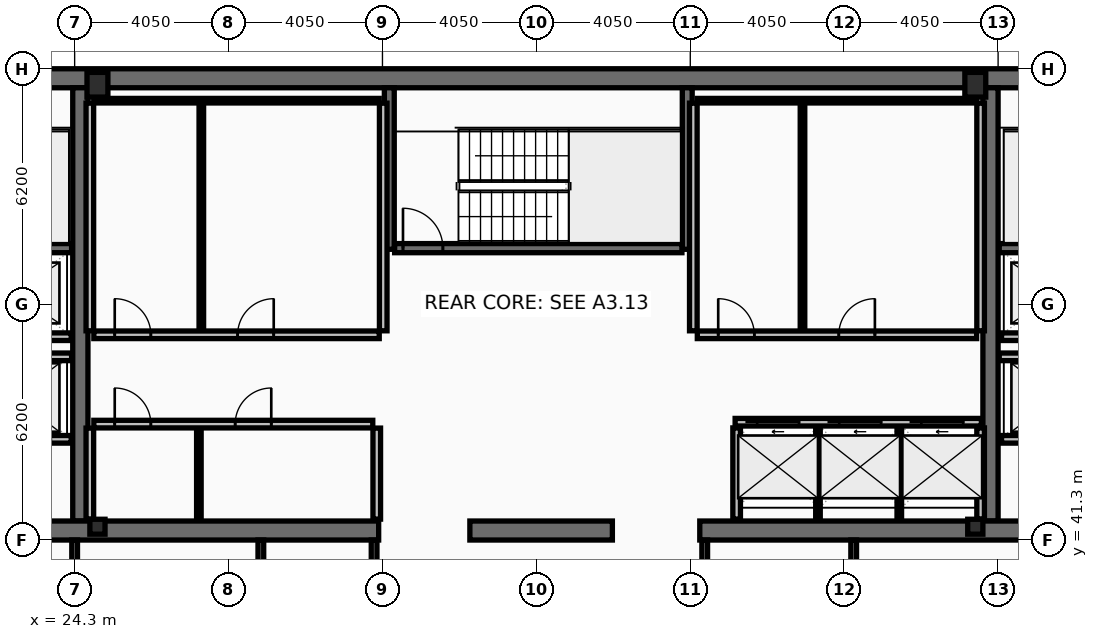
"""IFC4 building model, lengths in metres.
Left out: names, types, materials, properties, quantities, classifications, styles, units other than length and angle.
Written with IfcOpenShell. Run it as: python <this file> out.ifc"""

import sys

from ifc_helpers import new_model, si_unit, direction, frame, frame_2d, origin, origin_2d, place, context, subcontext, project, spatial, rectangle, hollow_rectangle, i_section, extrude, element, fill, save


model = new_model("IFC4")
c1 = context("Model", 3, precision=1e-05, world=origin(), true_north=direction((0.0, 1.0)))
c2 = subcontext(c1, "Body", "Model", "MODEL_VIEW")
j1 = project(units=[si_unit("LENGTHUNIT", "METRE"), si_unit("PLANEANGLEUNIT", "RADIAN")], contexts=[c1])
p1 = place(None, origin())
s1 = spatial("IfcSite", under=j1, at=p1, CompositionType="ELEMENT")
p2 = place(p1, origin())
s2 = spatial("IfcBuilding", under=s1, at=p2, CompositionType="ELEMENT")
p3 = place(p2, frame((0.0, 0.0, 339.8)))
s3 = spatial("IfcBuildingStorey", under=s2, at=p3, CompositionType="ELEMENT", Elevation=339.8)
p4 = place(p3, frame((16.2, 53.45, 0.0), z_axis=(0.0, 0.0, 1.0), x_axis=(1.0, 0.0, 0.0)))
e1 = element("IfcWall", 1, at=p4, inside=s3, PredefinedType="SHEAR", context=c2, shape_type="SweptSolid", body=[
    extrude(rectangle(XDim=40.5, YDim=0.5, at=frame_2d((20.25, 0.0))), origin(), (0.0, 0.0, 1.0), 3.44),
])
for number, where, z_axis, x_axis in (
    (2, (24.45, 41.8, 0.0), (0.0, 0.0, 1.0), (0.0, 1.0, 0.0)),
    (3, (48.4, 41.8, 0.0), (0.0, 0.0, 1.0), (0.0, 1.0, 0.0)),
):
    element("IfcWall", number, at=place(p3, frame(where, z_axis=z_axis, x_axis=x_axis)), inside=s3, PredefinedType="SHEAR", context=c2, shape_type="SweptSolid", body=[
        extrude(rectangle(XDim=11.4, YDim=0.4, at=frame_2d((5.7, 0.0))), origin(), (0.0, 0.0, 1.0), 3.44),
    ])
p5 = place(p3, frame((32.3, 41.55, 0.0), z_axis=(0.0, 0.0, 1.0), x_axis=(-1.0, 0.0, 0.0)))
e4 = element("IfcWall", 4, at=p5, inside=s3, PredefinedType="SHEAR", context=c2, shape_type="SweptSolid", body=[
    extrude(rectangle(XDim=11.45, YDim=0.5, at=frame_2d((5.725, 0.0))), origin(), (0.0, 0.0, 1.0), 3.44),
])
p6 = place(p3, frame((38.45, 41.55, 0.0), z_axis=(0.0, 0.0, 1.0), x_axis=(-1.0, 0.0, 0.0)))
e5 = element("IfcWall", 5, at=p6, inside=s3, PredefinedType="SHEAR", context=c2, shape_type="SweptSolid", body=[
    extrude(rectangle(XDim=3.75, YDim=0.5, at=frame_2d((1.875, 0.0))), origin(), (0.0, 0.0, 1.0), 3.44),
])
p7 = place(p3, frame((52.05, 41.55, 0.0), z_axis=(0.0, 0.0, 1.0), x_axis=(-1.0, 0.0, 0.0)))
e6 = element("IfcWall", 6, at=p7, inside=s3, PredefinedType="SHEAR", context=c2, shape_type="SweptSolid", body=[
    extrude(rectangle(XDim=11.3, YDim=0.5, at=frame_2d((5.65, 0.0))), origin(), (0.0, 0.0, 1.0), 3.44),
])
for number, where, z_axis, x_axis in (
    (7, (32.58, 48.95, 0.0), (0.0, 0.0, 1.0), (0.0, 1.0, 0.0)),
    (8, (40.42, 48.95, 0.0), (0.0, 0.0, 1.0), (0.0, 1.0, 0.0)),
):
    element("IfcWall", number, at=place(p3, frame(where, z_axis=z_axis, x_axis=x_axis)), inside=s3, PredefinedType="SHEAR", context=c2, shape_type="SweptSolid", body=[
        extrude(rectangle(XDim=4.25, YDim=0.26, at=frame_2d((2.125, 0.0))), origin(), (0.0, 0.0, 1.0), 3.44),
    ])
p8 = place(p3, frame((16.7, 48.98, 0.0), z_axis=(0.0, 0.0, 1.0), x_axis=(1.0, 0.0, 0.0)))
e9 = element("IfcWall", 9, at=p8, inside=s3, PredefinedType="SHEAR", context=c2, shape_type="SweptSolid", body=[
    extrude(rectangle(XDim=7.52, YDim=0.24, at=frame_2d((3.76, 0.0))), origin(), (0.0, 0.0, 1.0), 3.44),
])
p9 = place(p8, frame((0.22, 0.0, 0.0)))
e10 = element("IfcOpeningElement", 10, at=p9, cuts=e9, PredefinedType="OPENING", context=c2, shape_type="SweptSolid", body=[
    extrude(rectangle(XDim=1.05, YDim=2.15, at=frame_2d((0.525, 1.075))), frame((0.0, 0.13, 0.0), z_axis=(0.0, -1.0, 0.0), x_axis=(1.0, 0.0, 0.0)), (0.0, 0.0, 1.0), 0.26),
])
p10 = place(p3, frame((48.63, 48.98, 0.0), z_axis=(0.0, 0.0, 1.0), x_axis=(1.0, 0.0, 0.0)))
e11 = element("IfcWall", 11, at=p10, inside=s3, PredefinedType="SHEAR", context=c2, shape_type="SweptSolid", body=[
    extrude(rectangle(XDim=7.57, YDim=0.24, at=frame_2d((3.785, 0.0))), origin(), (0.0, 0.0, 1.0), 3.44),
])
p11 = place(p10, frame((6.3, 0.0, 0.0)))
e12 = element("IfcOpeningElement", 12, at=p11, cuts=e11, PredefinedType="OPENING", context=c2, shape_type="SweptSolid", body=[
    extrude(rectangle(XDim=1.05, YDim=2.15, at=frame_2d((0.525, 1.075))), frame((0.0, 0.13, 0.0), z_axis=(0.0, -1.0, 0.0), x_axis=(1.0, 0.0, 0.0)), (0.0, 0.0, 1.0), 0.26),
])
p12 = place(p3, frame((32.72, 48.98, 0.0), z_axis=(0.0, 0.0, 1.0), x_axis=(1.0, 0.0, 0.0)))
e13 = element("IfcWall", 13, at=p12, inside=s3, PredefinedType="SHEAR", context=c2, shape_type="SweptSolid", body=[
    extrude(rectangle(XDim=7.56, YDim=0.24, at=frame_2d((3.78, 0.0))), origin(), (0.0, 0.0, 1.0), 3.44),
])
p13 = place(p12, frame((0.22, 0.0, 0.0)))
e14 = element("IfcOpeningElement", 14, at=p13, cuts=e13, PredefinedType="OPENING", context=c2, shape_type="SweptSolid", body=[
    extrude(rectangle(XDim=1.05, YDim=2.15, at=frame_2d((0.525, 1.075))), frame((0.0, 0.13, 0.0), z_axis=(0.0, -1.0, 0.0), x_axis=(1.0, 0.0, 0.0)), (0.0, 0.0, 1.0), 0.26),
])
for number, where, z_axis, x_axis in (
    (15, (24.9, 53.28, 0.0), (0.0, 0.0, 1.0), (1.0, 0.0, 0.0)),
    (16, (48.0, 53.28, 0.0), (0.0, 0.0, 1.0), (1.0, 0.0, 0.0)),
):
    element("IfcColumn", number, at=place(p3, frame(where, z_axis=z_axis, x_axis=x_axis)), inside=s3, PredefinedType="COLUMN", context=c2, shape_type="SweptSolid", body=[
        extrude(hollow_rectangle(XDim=0.55, YDim=0.65, WallThickness=0.04, at=origin_2d()), origin(), (0.0, 0.0, 1.0), 3.6),
    ])
for number, where, z_axis, x_axis in (
    (17, (24.9, 41.65, 0.0), (0.0, 0.0, 1.0), (1.0, 0.0, 0.0)),
    (18, (48.0, 41.65, 0.0), (0.0, 0.0, 1.0), (1.0, 0.0, 0.0)),
):
    element("IfcColumn", number, at=place(p3, frame(where, z_axis=z_axis, x_axis=x_axis)), inside=s3, PredefinedType="COLUMN", context=c2, shape_type="SweptSolid", body=[
        extrude(i_section(OverallWidth=0.399, OverallDepth=0.393, WebThickness=0.023, FlangeThickness=0.037, at=origin_2d()), origin(), (0.0, 0.0, 1.0), 3.6),
    ])
p14 = place(p3, frame((41.68, 44.4, 0.0), z_axis=(0.0, 0.0, 1.0), x_axis=(1.0, 0.0, 0.0)))
e19 = element("IfcWall", 19, at=p14, inside=s3, PredefinedType="PARTITIONING", context=c2, shape_type="SweptSolid", body=[
    extrude(rectangle(XDim=6.48, YDim=0.2, at=frame_2d((3.24, 0.0))), origin(), (0.0, 0.0, 1.0), 3.44),
])
p15 = place(p14, frame((0.58, 0.0, 0.0)))
e20 = element("IfcOpeningElement", 20, at=p15, cuts=e19, PredefinedType="OPENING", context=c2, shape_type="SweptSolid", body=[
    extrude(rectangle(XDim=1.1, YDim=2.18, at=frame_2d((0.55, 1.09))), frame((0.0, 0.11, 0.0), z_axis=(0.0, -1.0, 0.0), x_axis=(1.0, 0.0, 0.0)), (0.0, 0.0, 1.0), 0.22),
])
p16 = place(p14, frame((2.74, 0.0, 0.0)))
e21 = element("IfcOpeningElement", 21, at=p16, cuts=e19, PredefinedType="OPENING", context=c2, shape_type="SweptSolid", body=[
    extrude(rectangle(XDim=1.1, YDim=2.18, at=frame_2d((0.55, 1.09))), frame((0.0, 0.11, 0.0), z_axis=(0.0, -1.0, 0.0), x_axis=(1.0, 0.0, 0.0)), (0.0, 0.0, 1.0), 0.22),
])
p17 = place(p14, frame((4.9, 0.0, 0.0)))
e22 = element("IfcOpeningElement", 22, at=p17, cuts=e19, PredefinedType="OPENING", context=c2, shape_type="SweptSolid", body=[
    extrude(rectangle(XDim=1.1, YDim=2.18, at=frame_2d((0.55, 1.09))), frame((0.0, 0.11, 0.0), z_axis=(0.0, -1.0, 0.0), x_axis=(1.0, 0.0, 0.0)), (0.0, 0.0, 1.0), 0.22),
])
p18 = place(p3, frame((51.61, 43.95, 0.0), z_axis=(0.0, 0.0, 1.0), x_axis=(-1.0, 0.0, 0.0)))
e23 = element("IfcWall", 23, at=p18, inside=s3, PredefinedType="PARTITIONING", context=c2, shape_type="SweptSolid", body=[
    extrude(rectangle(XDim=2.92, YDim=0.2, at=frame_2d((1.46, 0.0))), origin(), (0.0, 0.0, 1.0), 3.44),
])
p19 = place(p18, frame((0.81, 0.0, 0.0)))
e24 = element("IfcOpeningElement", 24, at=p19, cuts=e23, PredefinedType="OPENING", context=c2, shape_type="SweptSolid", body=[
    extrude(rectangle(XDim=1.3, YDim=2.18, at=frame_2d((0.65, 1.09))), frame((0.0, 0.11, 0.0), z_axis=(0.0, -1.0, 0.0), x_axis=(1.0, 0.0, 0.0)), (0.0, 0.0, 1.0), 0.22),
])
p20 = place(p3, frame((24.21, 43.95, 0.0), z_axis=(0.0, 0.0, 1.0), x_axis=(-1.0, 0.0, 0.0)))
e25 = element("IfcWall", 25, at=p20, inside=s3, PredefinedType="PARTITIONING", context=c2, shape_type="SweptSolid", body=[
    extrude(rectangle(XDim=2.97, YDim=0.2, at=frame_2d((1.485, 0.0))), origin(), (0.0, 0.0, 1.0), 3.44),
])
p21 = place(p20, frame((0.86, 0.0, 0.0)))
e26 = element("IfcOpeningElement", 26, at=p21, cuts=e25, PredefinedType="OPENING", context=c2, shape_type="SweptSolid", body=[
    extrude(rectangle(XDim=1.3, YDim=2.18, at=frame_2d((0.65, 1.09))), frame((0.0, 0.11, 0.0), z_axis=(0.0, -1.0, 0.0), x_axis=(1.0, 0.0, 0.0)), (0.0, 0.0, 1.0), 0.22),
])
p22 = place(p3, frame((51.61, 46.65, 0.0), z_axis=(0.0, 0.0, 1.0), x_axis=(-1.0, 0.0, 0.0)))
e27 = element("IfcWall", 27, at=p22, inside=s3, PredefinedType="PARTITIONING", context=c2, shape_type="SweptSolid", body=[
    extrude(rectangle(XDim=2.92, YDim=0.2, at=frame_2d((1.46, 0.0))), origin(), (0.0, 0.0, 1.0), 3.44),
])
p23 = place(p22, frame((0.86, 0.0, 0.0)))
e28 = element("IfcOpeningElement", 28, at=p23, cuts=e27, PredefinedType="OPENING", context=c2, shape_type="SweptSolid", body=[
    extrude(rectangle(XDim=1.2, YDim=2.18, at=frame_2d((0.6, 1.09))), frame((0.0, 0.11, 0.0), z_axis=(0.0, -1.0, 0.0), x_axis=(1.0, 0.0, 0.0)), (0.0, 0.0, 1.0), 0.22),
])
p24 = place(p3, frame((24.21, 46.65, 0.0), z_axis=(0.0, 0.0, 1.0), x_axis=(-1.0, 0.0, 0.0)))
e29 = element("IfcWall", 29, at=p24, inside=s3, PredefinedType="PARTITIONING", context=c2, shape_type="SweptSolid", body=[
    extrude(rectangle(XDim=2.97, YDim=0.2, at=frame_2d((1.485, 0.0))), origin(), (0.0, 0.0, 1.0), 3.44),
])
p25 = place(p24, frame((0.91, 0.0, 0.0)))
e30 = element("IfcOpeningElement", 30, at=p25, cuts=e29, PredefinedType="OPENING", context=c2, shape_type="SweptSolid", body=[
    extrude(rectangle(XDim=1.2, YDim=2.18, at=frame_2d((0.6, 1.09))), frame((0.0, 0.11, 0.0), z_axis=(0.0, -1.0, 0.0), x_axis=(1.0, 0.0, 0.0)), (0.0, 0.0, 1.0), 0.22),
])
p26 = place(p3, frame((21.2, 46.12, 0.0), z_axis=(0.0, 0.0, 1.0), x_axis=(1.0, 0.0, 0.0)))
e31 = element("IfcWall", 31, at=p26, inside=s3, PredefinedType="PARTITIONING", context=c2, shape_type="SweptSolid", body=[
    extrude(rectangle(XDim=3.02, YDim=0.2, at=frame_2d((1.51, 0.0))), origin(), (0.0, 0.0, 1.0), 3.44),
])
p27 = place(p3, frame((48.63, 46.12, 0.0), z_axis=(0.0, 0.0, 1.0), x_axis=(1.0, 0.0, 0.0)))
e32 = element("IfcWall", 32, at=p27, inside=s3, PredefinedType="PARTITIONING", context=c2, shape_type="SweptSolid", body=[
    extrude(rectangle(XDim=3.07, YDim=0.2, at=frame_2d((1.535, 0.0))), origin(), (0.0, 0.0, 1.0), 3.44),
])
for number, where, z_axis, x_axis in (
    (33, (24.7, 46.805, 0.0), (0.0, 0.0, 1.0), (0.0, 1.0, 0.0)),
    (34, (32.42, 46.805, 0.0), (0.0, 0.0, 1.0), (0.0, 1.0, 0.0)),
):
    element("IfcWall", number, at=place(p3, frame(where, z_axis=z_axis, x_axis=x_axis)), inside=s3, PredefinedType="PARTITIONING", context=c2, shape_type="SweptSolid", body=[
        extrude(rectangle(XDim=5.99, YDim=0.2, at=frame_2d((2.995, 0.0))), origin(), (0.0, 0.0, 1.0), 3.44),
    ])
p28 = place(p3, frame((24.805, 52.86, 0.0), z_axis=(0.0, 0.0, 1.0), x_axis=(1.0, 0.0, 0.0)))
e35 = element("IfcWall", 35, at=p28, inside=s3, PredefinedType="PARTITIONING", context=c2, shape_type="SweptSolid", body=[
    extrude(rectangle(XDim=7.51, YDim=0.12, at=frame_2d((3.755, 0.0))), origin(), (0.0, 0.0, 1.0), 3.44),
])
p29 = place(p3, frame((27.634, 46.805, 0.0), z_axis=(0.0, 0.0, 1.0), x_axis=(0.0, 1.0, 0.0)))
e36 = element("IfcWall", 36, at=p29, inside=s3, PredefinedType="PARTITIONING", context=c2, shape_type="SweptSolid", body=[
    extrude(rectangle(XDim=5.99, YDim=0.12, at=frame_2d((2.995, 0.0))), origin(), (0.0, 0.0, 1.0), 3.44),
])
p30 = place(p3, frame((24.805, 46.7, 0.0), z_axis=(0.0, 0.0, 1.0), x_axis=(1.0, 0.0, 0.0)))
e37 = element("IfcWall", 37, at=p30, inside=s3, PredefinedType="PARTITIONING", context=c2, shape_type="SweptSolid", body=[
    extrude(rectangle(XDim=7.51, YDim=0.2, at=frame_2d((3.755, 0.0))), origin(), (0.0, 0.0, 1.0), 3.44),
])
p31 = place(p30, frame((0.55, 0.0, 0.0)))
e38 = element("IfcOpeningElement", 38, at=p31, cuts=e37, PredefinedType="OPENING", context=c2, shape_type="SweptSolid", body=[
    extrude(rectangle(XDim=0.95, YDim=2.1, at=frame_2d((0.475, 1.05))), frame((0.0, 0.11, 0.0), z_axis=(0.0, -1.0, 0.0), x_axis=(1.0, 0.0, 0.0)), (0.0, 0.0, 1.0), 0.22),
])
p32 = place(p30, frame((3.784, 0.0, 0.0)))
e39 = element("IfcOpeningElement", 39, at=p32, cuts=e37, PredefinedType="OPENING", context=c2, shape_type="SweptSolid", body=[
    extrude(rectangle(XDim=0.95, YDim=2.1, at=frame_2d((0.475, 1.05))), frame((0.0, 0.11, 0.0), z_axis=(0.0, -1.0, 0.0), x_axis=(1.0, 0.0, 0.0)), (0.0, 0.0, 1.0), 0.22),
])
for number, where, z_axis, x_axis in (
    (40, (24.7, 41.85, 0.0), (0.0, 0.0, 1.0), (0.0, 1.0, 0.0)),
    (41, (32.25, 41.85, 0.0), (0.0, 0.0, 1.0), (0.0, 1.0, 0.0)),
):
    element("IfcWall", number, at=place(p3, frame(where, z_axis=z_axis, x_axis=x_axis)), inside=s3, PredefinedType="PARTITIONING", context=c2, shape_type="SweptSolid", body=[
        extrude(rectangle(XDim=2.395, YDim=0.2, at=frame_2d((1.198, 0.0))), origin(), (0.0, 0.0, 1.0), 3.44),
    ])
p33 = place(p3, frame((27.569, 41.85, 0.0), z_axis=(0.0, 0.0, 1.0), x_axis=(0.0, 1.0, 0.0)))
e42 = element("IfcWall", 42, at=p33, inside=s3, PredefinedType="PARTITIONING", context=c2, shape_type="SweptSolid", body=[
    extrude(rectangle(XDim=2.395, YDim=0.12, at=frame_2d((1.198, 0.0))), origin(), (0.0, 0.0, 1.0), 3.44),
])
p34 = place(p3, frame((24.805, 44.35, 0.0), z_axis=(0.0, 0.0, 1.0), x_axis=(1.0, 0.0, 0.0)))
e43 = element("IfcWall", 43, at=p34, inside=s3, PredefinedType="PARTITIONING", context=c2, shape_type="SweptSolid", body=[
    extrude(rectangle(XDim=7.34, YDim=0.2, at=frame_2d((3.67, 0.0))), origin(), (0.0, 0.0, 1.0), 3.44),
])
p35 = place(p34, frame((0.55, 0.0, 0.0)))
e44 = element("IfcOpeningElement", 44, at=p35, cuts=e43, PredefinedType="OPENING", context=c2, shape_type="SweptSolid", body=[
    extrude(rectangle(XDim=0.95, YDim=2.1, at=frame_2d((0.475, 1.05))), frame((0.0, 0.11, 0.0), z_axis=(0.0, -1.0, 0.0), x_axis=(1.0, 0.0, 0.0)), (0.0, 0.0, 1.0), 0.22),
])
p36 = place(p34, frame((3.719, 0.0, 0.0)))
e45 = element("IfcOpeningElement", 45, at=p36, cuts=e43, PredefinedType="OPENING", context=c2, shape_type="SweptSolid", body=[
    extrude(rectangle(XDim=0.95, YDim=2.1, at=frame_2d((0.475, 1.05))), frame((0.0, 0.11, 0.0), z_axis=(0.0, -1.0, 0.0), x_axis=(1.0, 0.0, 0.0)), (0.0, 0.0, 1.0), 0.22),
])
for number, where, z_axis, x_axis in (
    (46, (40.58, 46.805, 0.0), (0.0, 0.0, 1.0), (0.0, 1.0, 0.0)),
    (47, (48.14, 46.805, 0.0), (0.0, 0.0, 1.0), (0.0, 1.0, 0.0)),
):
    element("IfcWall", number, at=place(p3, frame(where, z_axis=z_axis, x_axis=x_axis)), inside=s3, PredefinedType="PARTITIONING", context=c2, shape_type="SweptSolid", body=[
        extrude(rectangle(XDim=5.99, YDim=0.2, at=frame_2d((2.995, 0.0))), origin(), (0.0, 0.0, 1.0), 3.44),
    ])
p37 = place(p3, frame((40.685, 52.86, 0.0), z_axis=(0.0, 0.0, 1.0), x_axis=(1.0, 0.0, 0.0)))
e48 = element("IfcWall", 48, at=p37, inside=s3, PredefinedType="PARTITIONING", context=c2, shape_type="SweptSolid", body=[
    extrude(rectangle(XDim=7.35, YDim=0.12, at=frame_2d((3.675, 0.0))), origin(), (0.0, 0.0, 1.0), 3.44),
])
p38 = place(p3, frame((43.453, 46.805, 0.0), z_axis=(0.0, 0.0, 1.0), x_axis=(0.0, 1.0, 0.0)))
e49 = element("IfcWall", 49, at=p38, inside=s3, PredefinedType="PARTITIONING", context=c2, shape_type="SweptSolid", body=[
    extrude(rectangle(XDim=5.99, YDim=0.12, at=frame_2d((2.995, 0.0))), origin(), (0.0, 0.0, 1.0), 3.44),
])
p39 = place(p3, frame((40.685, 46.7, 0.0), z_axis=(0.0, 0.0, 1.0), x_axis=(1.0, 0.0, 0.0)))
e50 = element("IfcWall", 50, at=p39, inside=s3, PredefinedType="PARTITIONING", context=c2, shape_type="SweptSolid", body=[
    extrude(rectangle(XDim=7.35, YDim=0.2, at=frame_2d((3.675, 0.0))), origin(), (0.0, 0.0, 1.0), 3.44),
])
p40 = place(p39, frame((0.55, 0.0, 0.0)))
e51 = element("IfcOpeningElement", 51, at=p40, cuts=e50, PredefinedType="OPENING", context=c2, shape_type="SweptSolid", body=[
    extrude(rectangle(XDim=0.95, YDim=2.1, at=frame_2d((0.475, 1.05))), frame((0.0, 0.11, 0.0), z_axis=(0.0, -1.0, 0.0), x_axis=(1.0, 0.0, 0.0)), (0.0, 0.0, 1.0), 0.22),
])
p41 = place(p39, frame((3.723, 0.0, 0.0)))
e52 = element("IfcOpeningElement", 52, at=p41, cuts=e50, PredefinedType="OPENING", context=c2, shape_type="SweptSolid", body=[
    extrude(rectangle(XDim=0.95, YDim=2.1, at=frame_2d((0.475, 1.05))), frame((0.0, 0.11, 0.0), z_axis=(0.0, -1.0, 0.0), x_axis=(1.0, 0.0, 0.0)), (0.0, 0.0, 1.0), 0.22),
])
for number, where, z_axis, x_axis in (
    (53, (41.72, 41.85, 0.0), (0.0, 0.0, 1.0), (0.0, 1.0, 0.0)),
    (54, (48.14, 41.85, 0.0), (0.0, 0.0, 1.0), (0.0, 1.0, 0.0)),
):
    element("IfcWall", number, at=place(p3, frame(where, z_axis=z_axis, x_axis=x_axis)), inside=s3, PredefinedType="PARTITIONING", context=c2, shape_type="SweptSolid", body=[
        extrude(rectangle(XDim=2.4, YDim=0.2, at=frame_2d((1.2, 0.0))), origin(), (0.0, 0.0, 1.0), 3.44),
    ])
for number, where, z_axis, x_axis in (
    (55, (43.86, 41.85, 0.0), (0.0, 0.0, 1.0), (0.0, 1.0, 0.0)),
    (56, (46.0, 41.85, 0.0), (0.0, 0.0, 1.0), (0.0, 1.0, 0.0)),
):
    element("IfcWall", number, at=place(p3, frame(where, z_axis=z_axis, x_axis=x_axis)), inside=s3, PredefinedType="PARTITIONING", context=c2, shape_type="SweptSolid", body=[
        extrude(rectangle(XDim=2.4, YDim=0.12, at=frame_2d((1.2, 0.0))), origin(), (0.0, 0.0, 1.0), 3.44),
    ])
for number, where, z_axis, x_axis in (
    (57, (24.3, 38.28, 0.0), (0.0, 0.0, 1.0), (0.0, 1.0, 0.0)),
    (58, (29.2, 38.28, 0.0), (0.0, 0.0, 1.0), (0.0, 1.0, 0.0)),
    (59, (32.18, 38.28, 0.0), (0.0, 0.0, 1.0), (0.0, 1.0, 0.0)),
    (60, (40.88, 38.28, 0.0), (0.0, 0.0, 1.0), (0.0, 1.0, 0.0)),
    (61, (44.8, 38.28, 0.0), (0.0, 0.0, 1.0), (0.0, 1.0, 0.0)),
):
    element("IfcWall", number, at=place(p3, frame(where, z_axis=z_axis, x_axis=x_axis)), inside=s3, PredefinedType="PARTITIONING", context=c2, shape_type="SweptSolid", body=[
        extrude(rectangle(XDim=3.02, YDim=0.15, at=frame_2d((1.51, 0.0))), origin(), (0.0, 0.0, 1.0), 3.44),
    ])
p42 = place(p13, origin())
e62 = element("IfcDoor", 62, at=p42, inside=s3, OperationType="SINGLE_SWING_LEFT", PredefinedType="DOOR", context=c2, shape_type="SweptSolid", body=[
    extrude(rectangle(XDim=1.05, YDim=2.15, at=frame_2d((0.525, 1.075))), frame((0.0, 0.025, 0.0), z_axis=(0.0, -1.0, 0.0), x_axis=(1.0, 0.0, 0.0)), (0.0, 0.0, 1.0), 0.05),
])
fill(e14, e62)
p43 = place(p15, origin())
e63 = element("IfcDoor", 63, at=p43, inside=s3, OperationType="SLIDING_TO_LEFT", PredefinedType="DOOR", context=c2, shape_type="SweptSolid", body=[
    extrude(rectangle(XDim=1.1, YDim=2.18, at=frame_2d((0.55, 1.09))), frame((0.0, 0.025, 0.0), z_axis=(0.0, -1.0, 0.0), x_axis=(1.0, 0.0, 0.0)), (0.0, 0.0, 1.0), 0.05),
])
fill(e20, e63)
p44 = place(p16, origin())
e64 = element("IfcDoor", 64, at=p44, inside=s3, OperationType="SLIDING_TO_LEFT", PredefinedType="DOOR", context=c2, shape_type="SweptSolid", body=[
    extrude(rectangle(XDim=1.1, YDim=2.18, at=frame_2d((0.55, 1.09))), frame((0.0, 0.025, 0.0), z_axis=(0.0, -1.0, 0.0), x_axis=(1.0, 0.0, 0.0)), (0.0, 0.0, 1.0), 0.05),
])
fill(e21, e64)
p45 = place(p17, origin())
e65 = element("IfcDoor", 65, at=p45, inside=s3, OperationType="SLIDING_TO_LEFT", PredefinedType="DOOR", context=c2, shape_type="SweptSolid", body=[
    extrude(rectangle(XDim=1.1, YDim=2.18, at=frame_2d((0.55, 1.09))), frame((0.0, 0.025, 0.0), z_axis=(0.0, -1.0, 0.0), x_axis=(1.0, 0.0, 0.0)), (0.0, 0.0, 1.0), 0.05),
])
fill(e22, e65)
p46 = place(p31, origin())
e66 = element("IfcDoor", 66, at=p46, inside=s3, OperationType="SINGLE_SWING_LEFT", PredefinedType="DOOR", context=c2, shape_type="SweptSolid", body=[
    extrude(rectangle(XDim=0.95, YDim=2.1, at=frame_2d((0.475, 1.05))), frame((0.0, 0.025, 0.0), z_axis=(0.0, -1.0, 0.0), x_axis=(1.0, 0.0, 0.0)), (0.0, 0.0, 1.0), 0.05),
])
fill(e38, e66)
p47 = place(p32, origin())
e67 = element("IfcDoor", 67, at=p47, inside=s3, OperationType="SINGLE_SWING_RIGHT", PredefinedType="DOOR", context=c2, shape_type="SweptSolid", body=[
    extrude(rectangle(XDim=0.95, YDim=2.1, at=frame_2d((0.475, 1.05))), frame((0.0, 0.025, 0.0), z_axis=(0.0, -1.0, 0.0), x_axis=(1.0, 0.0, 0.0)), (0.0, 0.0, 1.0), 0.05),
])
fill(e39, e67)
p48 = place(p35, origin())
e68 = element("IfcDoor", 68, at=p48, inside=s3, OperationType="SINGLE_SWING_LEFT", PredefinedType="DOOR", context=c2, shape_type="SweptSolid", body=[
    extrude(rectangle(XDim=0.95, YDim=2.1, at=frame_2d((0.475, 1.05))), frame((0.0, 0.025, 0.0), z_axis=(0.0, -1.0, 0.0), x_axis=(1.0, 0.0, 0.0)), (0.0, 0.0, 1.0), 0.05),
])
fill(e44, e68)
p49 = place(p36, origin())
e69 = element("IfcDoor", 69, at=p49, inside=s3, OperationType="SINGLE_SWING_RIGHT", PredefinedType="DOOR", context=c2, shape_type="SweptSolid", body=[
    extrude(rectangle(XDim=0.95, YDim=2.1, at=frame_2d((0.475, 1.05))), frame((0.0, 0.025, 0.0), z_axis=(0.0, -1.0, 0.0), x_axis=(1.0, 0.0, 0.0)), (0.0, 0.0, 1.0), 0.05),
])
fill(e45, e69)
p50 = place(p40, origin())
e70 = element("IfcDoor", 70, at=p50, inside=s3, OperationType="SINGLE_SWING_LEFT", PredefinedType="DOOR", context=c2, shape_type="SweptSolid", body=[
    extrude(rectangle(XDim=0.95, YDim=2.1, at=frame_2d((0.475, 1.05))), frame((0.0, 0.025, 0.0), z_axis=(0.0, -1.0, 0.0), x_axis=(1.0, 0.0, 0.0)), (0.0, 0.0, 1.0), 0.05),
])
fill(e51, e70)
p51 = place(p41, origin())
e71 = element("IfcDoor", 71, at=p51, inside=s3, OperationType="SINGLE_SWING_RIGHT", PredefinedType="DOOR", context=c2, shape_type="SweptSolid", body=[
    extrude(rectangle(XDim=0.95, YDim=2.1, at=frame_2d((0.475, 1.05))), frame((0.0, 0.025, 0.0), z_axis=(0.0, -1.0, 0.0), x_axis=(1.0, 0.0, 0.0)), (0.0, 0.0, 1.0), 0.05),
])
fill(e52, e71)
save(model, sys.argv[1])
